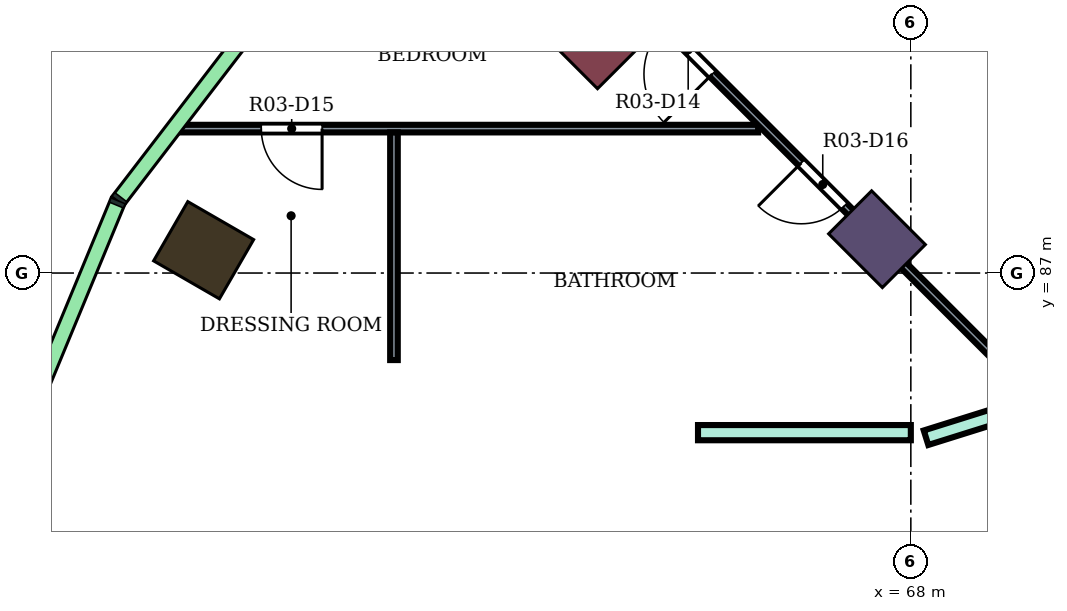
"""IFC4 building model, lengths in metres.
Left out: names, types, materials, properties, quantities, classifications, styles, units other than length and angle.
Written with IfcOpenShell. Run it as: python <this file> out.ifc"""

import sys

from ifc_helpers import new_model, si_unit, direction, frame, frame_2d, origin, origin_2d, place, context, subcontext, project, spatial, rectangle, extrude, element, fill, save


model = new_model("IFC4")
c1 = context("Model", 3, precision=1e-05, world=origin(), true_north=direction((0.0, 1.0)))
c2 = subcontext(c1, "Body", "Model", "MODEL_VIEW")
j1 = project(units=[si_unit("LENGTHUNIT", "METRE"), si_unit("PLANEANGLEUNIT", "RADIAN")], contexts=[c1])
p1 = place(None, origin())
s1 = spatial("IfcSite", under=j1, at=p1, CompositionType="ELEMENT")
p2 = place(p1, origin())
s2 = spatial("IfcBuilding", under=s1, at=p2, CompositionType="ELEMENT")
p3 = place(p2, frame((0.0, 0.0, 190.5)))
s3 = spatial("IfcBuildingStorey", under=s2, at=p3, CompositionType="ELEMENT", Elevation=190.5)
p4 = place(p3, frame((58.696, 87.3, 0.0), z_axis=(0.0, 0.0, 1.0), x_axis=(-0.866025403784, 0.5, 0.0)))
e1 = element("IfcColumn", 1, at=p4, inside=s3, PredefinedType="COLUMN", context=c2, shape_type="SweptSolid", body=[
    extrude(rectangle(XDim=1.0, YDim=0.9, at=origin_2d()), origin(), (0.0, 0.0, 1.0), 4.1),
])
p5 = place(p3, frame((67.555, 87.445, 0.0), z_axis=(0.0, 0.0, 1.0), x_axis=(-0.707106781187, 0.707106781187, 0.0)))
e2 = element("IfcColumn", 2, at=p5, inside=s3, PredefinedType="COLUMN", context=c2, shape_type="SweptSolid", body=[
    extrude(rectangle(XDim=1.0, YDim=0.8, at=origin_2d()), origin(), (0.0, 0.0, 1.0), 4.1),
])
p6 = place(p3, frame((64.09, 90.91, 0.0), z_axis=(0.0, 0.0, 1.0), x_axis=(-0.707106781187, 0.707106781187, 0.0)))
e3 = element("IfcColumn", 3, at=p6, inside=s3, PredefinedType="COLUMN", context=c2, shape_type="SweptSolid", body=[
    extrude(rectangle(XDim=1.8, YDim=2.4, at=origin_2d()), origin(), (0.0, 0.0, 1.0), 4.1),
])
p7 = place(p3, frame((65.2, 84.9, 0.0), z_axis=(0.0, 0.0, 1.0), x_axis=(1.0, 0.0, 0.0)))
e4 = element("IfcWall", 4, at=p7, inside=s3, PredefinedType="PARTITIONING", context=c2, shape_type="SweptSolid", body=[
    extrude(rectangle(XDim=2.8, YDim=0.2, at=frame_2d((1.4, 0.0))), origin(), (0.0, 0.0, 1.0), 3.65),
])
p8 = place(p3, frame((67.102, 97.342, 0.0), z_axis=(0.0, 0.0, 1.0), x_axis=(0.499940938316, -0.866059500378, 0.0)))
e5 = element("IfcWall", 5, at=p8, inside=s3, PredefinedType="PARTITIONING", context=c2, shape_type="SweptSolid", body=[
    extrude(rectangle(XDim=12.446, YDim=0.2, at=frame_2d((6.223, 0.0))), origin(), (0.0, 0.0, 1.0), 3.65),
])
p9 = place(p3, frame((68.2, 84.833, 0.0), z_axis=(0.0, 0.0, 1.0), x_axis=(0.954204109499, 0.299156342762, 0.0)))
e6 = element("IfcWall", 6, at=p9, inside=s3, PredefinedType="PARTITIONING", context=c2, shape_type="SweptSolid", body=[
    extrude(rectangle(XDim=5.74, YDim=0.2, at=frame_2d((2.87, 0.0))), origin(), (0.0, 0.0, 1.0), 3.65),
])
p10 = place(p9, frame((3.903, 0.0, 0.0)))
e7 = element("IfcOpeningElement", 7, at=p10, cuts=e6, PredefinedType="OPENING", context=c2, shape_type="SweptSolid", body=[
    extrude(rectangle(XDim=1.0, YDim=2.1, at=frame_2d((0.5, 1.05))), frame((0.0, 0.11, 0.0), z_axis=(0.0, -1.0, 0.0), x_axis=(1.0, 0.0, 0.0)), (0.0, 0.0, 1.0), 0.22),
])
p11 = place(p3, frame((58.379, 88.9, 0.0), z_axis=(0.0, 0.0, 1.0), x_axis=(1.0, 0.0, 0.0)))
e8 = element("IfcWall", 8, at=p11, inside=s3, PredefinedType="PARTITIONING", context=c2, shape_type="SweptSolid", body=[
    extrude(rectangle(XDim=7.612, YDim=0.1, at=frame_2d((3.806, 0.0))), origin(), (0.0, 0.0, 1.0), 3.65),
])
p12 = place(p11, frame((1.075, 0.0, 0.0)))
e9 = element("IfcOpeningElement", 9, at=p12, cuts=e8, PredefinedType="OPENING", context=c2, shape_type="SweptSolid", body=[
    extrude(rectangle(XDim=0.8, YDim=2.1, at=frame_2d((0.4, 1.05))), frame((0.0, 0.06, 0.0), z_axis=(0.0, -1.0, 0.0), x_axis=(1.0, 0.0, 0.0)), (0.0, 0.0, 1.0), 0.12),
])
p13 = place(p3, frame((61.2, 85.855, 0.0), z_axis=(0.0, 0.0, 1.0), x_axis=(0.0, 1.0, 0.0)))
e10 = element("IfcWall", 10, at=p13, inside=s3, PredefinedType="PARTITIONING", context=c2, shape_type="SweptSolid", body=[
    extrude(rectangle(XDim=2.995, YDim=0.1, at=frame_2d((1.498, 0.0))), origin(), (0.0, 0.0, 1.0), 3.65),
])
p14 = place(p3, frame((63.599, 91.409, 0.0), z_axis=(0.0, 0.0, 1.0), x_axis=(0.706920044618, -0.707293468453, 0.0)))
e11 = element("IfcWall", 11, at=p14, inside=s3, PredefinedType="PARTITIONING", context=c2, shape_type="SweptSolid", body=[
    extrude(rectangle(XDim=8.499, YDim=0.1, at=frame_2d((4.25, 0.0))), origin(), (0.0, 0.0, 1.0), 3.65),
])
p15 = place(p14, frame((1.632, 0.0, 0.0)))
e12 = element("IfcOpeningElement", 12, at=p15, cuts=e11, PredefinedType="OPENING", context=c2, shape_type="SweptSolid", body=[
    extrude(rectangle(XDim=0.9, YDim=2.1, at=frame_2d((0.45, 1.05))), frame((0.0, 0.06, 0.0), z_axis=(0.0, -1.0, 0.0), x_axis=(1.0, 0.0, 0.0)), (0.0, 0.0, 1.0), 0.12),
])
p16 = place(p14, frame((4.186, 0.0, 0.0)))
e13 = element("IfcOpeningElement", 13, at=p16, cuts=e11, PredefinedType="OPENING", context=c2, shape_type="SweptSolid", body=[
    extrude(rectangle(XDim=0.8, YDim=2.1, at=frame_2d((0.4, 1.05))), frame((0.0, 0.06, 0.0), z_axis=(0.0, -1.0, 0.0), x_axis=(1.0, 0.0, 0.0)), (0.0, 0.0, 1.0), 0.12),
])
p17 = place(p15, frame((0.9, 0.0, 0.0), z_axis=(0.0, 0.0, 1.0), x_axis=(-1.0, 0.0, 0.0)))
e14 = element("IfcDoor", 14, at=p17, inside=s3, OperationType="SINGLE_SWING_LEFT", PredefinedType="DOOR", context=c2, shape_type="SweptSolid", body=[
    extrude(rectangle(XDim=0.9, YDim=2.1, at=frame_2d((0.45, 1.05))), frame((0.0, 0.025, 0.0), z_axis=(0.0, -1.0, 0.0), x_axis=(1.0, 0.0, 0.0)), (0.0, 0.0, 1.0), 0.05),
])
fill(e12, e14)
p18 = place(p12, frame((0.8, 0.0, 0.0), z_axis=(0.0, 0.0, 1.0), x_axis=(-1.0, 0.0, 0.0)))
e15 = element("IfcDoor", 15, at=p18, inside=s3, OperationType="SINGLE_SWING_LEFT", PredefinedType="DOOR", context=c2, shape_type="SweptSolid", body=[
    extrude(rectangle(XDim=0.8, YDim=2.1, at=frame_2d((0.4, 1.05))), frame((0.0, 0.025, 0.0), z_axis=(0.0, -1.0, 0.0), x_axis=(1.0, 0.0, 0.0)), (0.0, 0.0, 1.0), 0.05),
])
fill(e9, e15)
p19 = place(p16, frame((0.8, 0.0, 0.0), z_axis=(0.0, 0.0, 1.0), x_axis=(-1.0, 0.0, 0.0)))
e16 = element("IfcDoor", 16, at=p19, inside=s3, OperationType="SINGLE_SWING_RIGHT", PredefinedType="DOOR", context=c2, shape_type="SweptSolid", body=[
    extrude(rectangle(XDim=0.8, YDim=2.1, at=frame_2d((0.4, 1.05))), frame((0.0, 0.025, 0.0), z_axis=(0.0, -1.0, 0.0), x_axis=(1.0, 0.0, 0.0)), (0.0, 0.0, 1.0), 0.05),
])
fill(e13, e16)
save(model, sys.argv[1])
